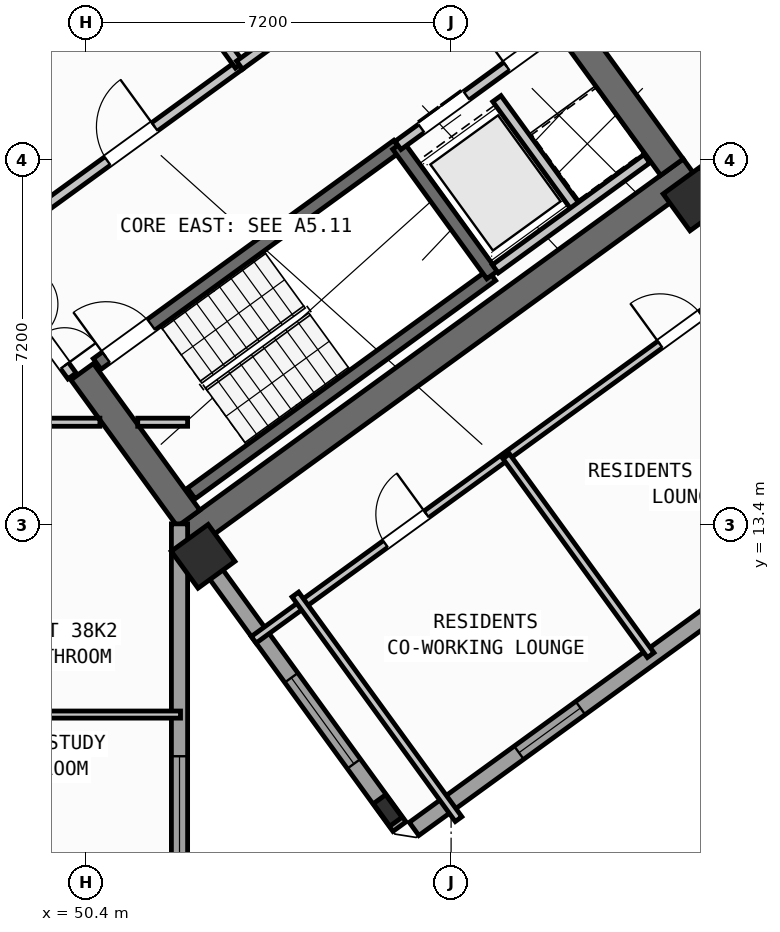
"""IFC4 building model, lengths in metres.
Left out: names, types, materials, properties, quantities, classifications, styles, units other than length and angle.
Written with IfcOpenShell. Run it as: python <this file> out.ifc"""

import sys

from ifc_helpers import new_model, si_unit, direction, frame, frame_2d, origin, origin_2d, place, context, subcontext, project, spatial, rectangle, hollow_rectangle, i_section, extrude, source, transform, mapped, element, fill, save


model = new_model("IFC4")
c1 = context("Model", 3, precision=1e-05, world=origin(), true_north=direction((0.0, 1.0)))
c2 = subcontext(c1, "Body", "Model", "MODEL_VIEW")
j1 = project(units=[si_unit("LENGTHUNIT", "METRE"), si_unit("PLANEANGLEUNIT", "RADIAN")], contexts=[c1])
p1 = place(None, origin())
s1 = spatial("IfcSite", under=j1, at=p1, CompositionType="ELEMENT")
p2 = place(p1, origin())
s2 = spatial("IfcBuilding", under=s1, at=p2, CompositionType="ELEMENT")
p3 = place(p2, frame((0.0, 0.0, 151.5)))
s3 = spatial("IfcBuildingStorey", under=s2, at=p3, CompositionType="ELEMENT", Elevation=151.5)
p4 = place(p3, frame((52.359, 13.14, 0.0), z_axis=(0.0, 0.0, 1.0), x_axis=(0.809014896919, 0.587788139183, 0.0)))
e1 = element("IfcWall", 1, at=p4, inside=s3, PredefinedType="SHEAR", context=c2, shape_type="SweptSolid", body=[
    extrude(rectangle(XDim=12.34, YDim=0.55, at=frame_2d((6.17, 0.0))), origin(), (0.0, 0.0, 1.0), 3.35),
])
for number, where, z_axis, x_axis in (
    (2, (52.42, 13.524, 0.0), (0.0, 0.0, 1.0), (-0.588, 0.809, 0.0)),
    (3, (61.958, 20.454, 0.0), (0.0, 0.0, 1.0), (-0.588, 0.809, 0.0)),
):
    element("IfcWall", number, at=place(p3, frame(where, z_axis=z_axis, x_axis=x_axis)), inside=s3, PredefinedType="SHEAR", context=c2, shape_type="SweptSolid", body=[
        extrude(rectangle(XDim=3.575, YDim=0.55, at=frame_2d((1.788, 0.0))), origin(), (0.0, 0.0, 1.0), 3.35),
    ])
m1 = source(origin(), c2, "Body", "SweptSolid", [
    extrude(i_section(OverallWidth=0.3, OverallDepth=0.55, WebThickness=0.015, FlangeThickness=0.029, at=origin_2d()), origin(), (0.0, 0.0, 1.0), 3.6),
])
p5 = place(p3, frame((56.35, 7.758, 0.0), z_axis=(0.0, 0.0, 1.0), x_axis=(0.809016994375, 0.587785252292, 0.0)))
e4 = element("IfcColumn", 4, at=p5, inside=s3, PredefinedType="COLUMN", context=c2, shape_type="MappedRepresentation", body=[
    mapped(m1, transform((0.0, 0.0, 0.0), scale=1.0)),
])
m2 = source(origin(), c2, "Body", "SweptSolid", [
    extrude(hollow_rectangle(XDim=0.9, YDim=0.9, WallThickness=0.036, at=origin_2d()), origin(), (0.0, 0.0, 1.0), 3.6),
])
for number, where, z_axis, x_axis in (
    (5, (52.705, 12.773, 0.0), (0.0, 0.0, 1.0), (0.809, 0.588, 0.0)),
    (6, (62.414, 19.827, 0.0), (0.0, 0.0, 1.0), (0.809, 0.588, 0.0)),
):
    element("IfcColumn", number, at=place(p3, frame(where, z_axis=z_axis, x_axis=x_axis)), inside=s3, PredefinedType="COLUMN", context=c2, shape_type="MappedRepresentation", body=[
        mapped(m2, transform((0.0, 0.0, 0.0), scale=1.0)),
    ])
p6 = place(p3, frame((58.455, 35.484, 0.0), z_axis=(0.0, 0.0, 1.0), x_axis=(0.587783625747, -0.809018176127, 0.0)))
e7 = element("IfcWall", 7, at=p6, inside=s3, PredefinedType="STANDARD", context=c2, shape_type="SweptSolid", body=[
    extrude(rectangle(XDim=21.587, YDim=0.32, at=frame_2d((10.794, 0.0))), origin(), (0.0, 0.0, 1.0), 2.775),
])
p7 = place(p6, frame((1.504, 0.0, 0.85)))
e8 = element("IfcOpeningElement", 8, at=p7, cuts=e7, PredefinedType="OPENING", context=c2, shape_type="SweptSolid", body=[
    extrude(rectangle(XDim=1.8, YDim=1.5, at=frame_2d((0.9, 0.75))), frame((0.0, 0.17, 0.0), z_axis=(0.0, -1.0, 0.0), x_axis=(1.0, 0.0, 0.0)), (0.0, 0.0, 1.0), 0.34),
])
p8 = place(p6, frame((10.444, 0.0, 0.85)))
e9 = element("IfcOpeningElement", 9, at=p8, cuts=e7, PredefinedType="OPENING", context=c2, shape_type="SweptSolid", body=[
    extrude(rectangle(XDim=1.8, YDim=1.5, at=frame_2d((0.9, 0.75))), frame((0.0, 0.17, 0.0), z_axis=(0.0, -1.0, 0.0), x_axis=(1.0, 0.0, 0.0)), (0.0, 0.0, 1.0), 0.34),
])
p9 = place(p6, frame((17.62, 0.0, 0.85)))
e10 = element("IfcOpeningElement", 10, at=p9, cuts=e7, PredefinedType="OPENING", context=c2, shape_type="SweptSolid", body=[
    extrude(rectangle(XDim=1.5, YDim=1.5, at=frame_2d((0.75, 0.75))), frame((0.0, 0.17, 0.0), z_axis=(0.0, -1.0, 0.0), x_axis=(1.0, 0.0, 0.0)), (0.0, 0.0, 1.0), 0.34),
])
p10 = place(p3, frame((71.098, 17.731, 0.0), z_axis=(0.0, 0.0, 1.0), x_axis=(-0.809021120468, -0.587779573171, 0.0)))
e11 = element("IfcWall", 11, at=p10, inside=s3, PredefinedType="STANDARD", context=c2, shape_type="SweptSolid", body=[
    extrude(rectangle(XDim=17.588, YDim=0.32, at=frame_2d((8.794, 0.0))), origin(), (0.0, 0.0, 1.0), 3.35),
])
p11 = place(p10, frame((1.624, 0.0, 0.0)))
e12 = element("IfcOpeningElement", 12, at=p11, cuts=e11, PredefinedType="OPENING", context=c2, shape_type="SweptSolid", body=[
    extrude(rectangle(XDim=1.05, YDim=2.15, at=frame_2d((0.525, 1.075))), frame((0.0, 0.17, 0.0), z_axis=(0.0, -1.0, 0.0), x_axis=(1.0, 0.0, 0.0)), (0.0, 0.0, 1.0), 0.34),
])
p12 = place(p10, frame((4.104, 0.0, 1.0)))
e13 = element("IfcOpeningElement", 13, at=p12, cuts=e11, PredefinedType="OPENING", context=c2, shape_type="SweptSolid", body=[
    extrude(rectangle(XDim=0.9, YDim=1.25, at=frame_2d((0.45, 0.625))), frame((0.0, 0.17, 0.0), z_axis=(0.0, -1.0, 0.0), x_axis=(1.0, 0.0, 0.0)), (0.0, 0.0, 1.0), 0.34),
])
p13 = place(p10, frame((7.879, 0.0, 0.85)))
e14 = element("IfcOpeningElement", 14, at=p13, cuts=e11, PredefinedType="OPENING", context=c2, shape_type="SweptSolid", body=[
    extrude(rectangle(XDim=1.8, YDim=1.5, at=frame_2d((0.9, 0.75))), frame((0.0, 0.17, 0.0), z_axis=(0.0, -1.0, 0.0), x_axis=(1.0, 0.0, 0.0)), (0.0, 0.0, 1.0), 0.34),
])
p14 = place(p10, frame((13.529, 0.0, 0.85)))
e15 = element("IfcOpeningElement", 15, at=p14, cuts=e11, PredefinedType="OPENING", context=c2, shape_type="SweptSolid", body=[
    extrude(rectangle(XDim=1.5, YDim=1.5, at=frame_2d((0.75, 0.75))), frame((0.0, 0.17, 0.0), z_axis=(0.0, -1.0, 0.0), x_axis=(1.0, 0.0, 0.0)), (0.0, 0.0, 1.0), 0.34),
])
p15 = place(p3, frame((56.581, 7.439, 0.0), z_axis=(0.0, 0.0, 1.0), x_axis=(-0.587771678454, 0.809026856172, 0.0)))
e16 = element("IfcWall", 16, at=p15, inside=s3, PredefinedType="STANDARD", context=c2, shape_type="SweptSolid", body=[
    extrude(rectangle(XDim=6.824, YDim=0.32, at=frame_2d((3.412, 0.0))), origin(), (0.0, 0.0, 1.0), 2.775),
])
p16 = place(p15, frame((1.531, 0.0, 0.8)))
e17 = element("IfcOpeningElement", 17, at=p16, cuts=e16, PredefinedType="OPENING", context=c2, shape_type="SweptSolid", body=[
    extrude(rectangle(XDim=2.1, YDim=1.55, at=frame_2d((1.05, 0.775))), frame((0.0, 0.17, 0.0), z_axis=(0.0, -1.0, 0.0), x_axis=(1.0, 0.0, 0.0)), (0.0, 0.0, 1.0), 0.34),
])
p17 = place(p3, frame((52.24, 13.414, 0.0), z_axis=(0.0, 0.0, 1.0), x_axis=(0.0, -1.0, 0.0)))
e18 = element("IfcWall", 18, at=p17, inside=s3, PredefinedType="STANDARD", context=c2, shape_type="SweptSolid", body=[
    extrude(rectangle(XDim=9.948, YDim=0.32, at=frame_2d((4.974, 0.0))), origin(), (0.0, 0.0, 1.0), 3.35),
])
p18 = place(p17, frame((4.586, 0.0, 0.8)))
e19 = element("IfcOpeningElement", 19, at=p18, cuts=e18, PredefinedType="OPENING", context=c2, shape_type="SweptSolid", body=[
    extrude(rectangle(XDim=2.1, YDim=1.55, at=frame_2d((1.05, 0.775))), frame((0.0, 0.17, 0.0), z_axis=(0.0, -1.0, 0.0), x_axis=(1.0, 0.0, 0.0)), (0.0, 0.0, 1.0), 0.34),
])
p19 = place(p17, frame((8.298, 0.0, 1.0)))
e20 = element("IfcOpeningElement", 20, at=p19, cuts=e18, PredefinedType="OPENING", context=c2, shape_type="SweptSolid", body=[
    extrude(rectangle(XDim=0.9, YDim=1.25, at=frame_2d((0.45, 0.625))), frame((0.0, 0.17, 0.0), z_axis=(0.0, -1.0, 0.0), x_axis=(1.0, 0.0, 0.0)), (0.0, 0.0, 1.0), 0.34),
])
p20 = place(p3, frame((52.472, 14.013, 0.0), z_axis=(0.0, 0.0, 1.0), x_axis=(0.809028366311, 0.587769599847, 0.0)))
e21 = element("IfcWall", 21, at=p20, inside=s3, PredefinedType="SHEAR", context=c2, shape_type="SweptSolid", body=[
    extrude(rectangle(XDim=7.33, YDim=0.26, at=frame_2d((3.665, 0.0))), origin(), (0.0, 0.0, 1.0), 3.35),
])
p21 = place(p3, frame((50.615, 16.57, 0.0), z_axis=(0.0, 0.0, 1.0), x_axis=(0.809028366311, 0.587769599847, 0.0)))
e22 = element("IfcWall", 22, at=p21, inside=s3, PredefinedType="SHEAR", context=c2, shape_type="SweptSolid", body=[
    extrude(rectangle(XDim=7.33, YDim=0.26, at=frame_2d((3.665, 0.0))), origin(), (0.0, 0.0, 1.0), 3.35),
])
p22 = place(p21, frame((0.22, 0.0, 0.0)))
e23 = element("IfcOpeningElement", 23, at=p22, cuts=e22, PredefinedType="OPENING", context=c2, shape_type="SweptSolid", body=[
    extrude(rectangle(XDim=1.1, YDim=2.1, at=frame_2d((0.55, 1.05))), frame((0.0, 0.14, 0.0), z_axis=(0.0, -1.0, 0.0), x_axis=(1.0, 0.0, 0.0)), (0.0, 0.0, 1.0), 0.28),
])
p23 = place(p3, frame((58.41, 18.327, 0.0), z_axis=(0.0, 0.0, 1.0), x_axis=(-0.58776738483, 0.809029975545, 0.0)))
e24 = element("IfcWall", 24, at=p23, inside=s3, PredefinedType="SHEAR", context=c2, shape_type="SweptSolid", body=[
    extrude(rectangle(XDim=3.16, YDim=0.26, at=frame_2d((1.58, 0.0))), origin(), (0.0, 0.0, 1.0), 3.35),
])
p24 = place(p3, frame((47.065, 21.407, 0.0), z_axis=(0.0, 0.0, 1.0), x_axis=(0.809032984992, 0.587763242466, 0.0)))
e25 = element("IfcWall", 25, at=p24, inside=s3, PredefinedType="STANDARD", context=c2, shape_type="SweptSolid", body=[
    extrude(rectangle(XDim=3.448, YDim=0.2, at=frame_2d((1.724, 0.0))), origin(), (0.0, 0.0, 1.0), 3.34),
])
p25 = place(p24, frame((0.458, 0.0, 0.0)))
e26 = element("IfcOpeningElement", 26, at=p25, cuts=e25, PredefinedType="OPENING", context=c2, shape_type="SweptSolid", body=[
    extrude(rectangle(XDim=1.3, YDim=2.2, at=frame_2d((0.65, 1.1))), frame((0.0, 0.11, 0.0), z_axis=(0.0, -1.0, 0.0), x_axis=(1.0, 0.0, 0.0)), (0.0, 0.0, 1.0), 0.22),
])
p26 = place(p3, frame((48.758, 19.077, 0.0), z_axis=(0.0, 0.0, 1.0), x_axis=(0.809005065155, 0.587801671104, 0.0)))
e27 = element("IfcWall", 27, at=p26, inside=s3, PredefinedType="STANDARD", context=c2, shape_type="SweptSolid", body=[
    extrude(rectangle(XDim=5.768, YDim=0.2, at=frame_2d((2.884, 0.0))), origin(), (0.0, 0.0, 1.0), 3.34),
])
p27 = place(p26, frame((2.548, 0.0, 0.0)))
e28 = element("IfcOpeningElement", 28, at=p27, cuts=e27, PredefinedType="OPENING", context=c2, shape_type="SweptSolid", body=[
    extrude(rectangle(XDim=1.15, YDim=2.1, at=frame_2d((0.575, 1.05))), frame((0.0, 0.11, 0.0), z_axis=(0.0, -1.0, 0.0), x_axis=(1.0, 0.0, 0.0)), (0.0, 0.0, 1.0), 0.22),
])
p28 = place(p3, frame((56.553, 20.884, 0.0), z_axis=(0.0, 0.0, 1.0), x_axis=(0.809023564264, 0.58777620951, 0.0)))
e29 = element("IfcWall", 29, at=p28, inside=s3, PredefinedType="STANDARD", context=c2, shape_type="SweptSolid", body=[
    extrude(rectangle(XDim=3.818, YDim=0.2, at=frame_2d((1.909, 0.0))), origin(), (0.0, 0.0, 1.0), 3.34),
])
p29 = place(p28, frame((0.57, 0.0, 0.0)))
e30 = element("IfcOpeningElement", 30, at=p29, cuts=e29, PredefinedType="OPENING", context=c2, shape_type="SweptSolid", body=[
    extrude(rectangle(XDim=1.1, YDim=2.15, at=frame_2d((0.55, 1.075))), frame((0.0, 0.11, 0.0), z_axis=(0.0, -1.0, 0.0), x_axis=(1.0, 0.0, 0.0)), (0.0, 0.0, 1.0), 0.22),
])
p30 = place(p28, frame((2.65, 0.0, 0.0)))
e31 = element("IfcOpeningElement", 31, at=p30, cuts=e29, PredefinedType="OPENING", context=c2, shape_type="SweptSolid", body=[
    extrude(rectangle(XDim=0.86, YDim=2.05, at=frame_2d((0.43, 1.025))), frame((0.0, 0.11, 0.0), z_axis=(0.0, -1.0, 0.0), x_axis=(1.0, 0.0, 0.0)), (0.0, 0.0, 1.0), 0.22),
])
p31 = place(p3, frame((60.067, 19.655, 0.0), z_axis=(0.0, 0.0, 1.0), x_axis=(-0.587800520745, 0.809005900975, 0.0)))
e32 = element("IfcWall", 32, at=p31, inside=s3, PredefinedType="STANDARD", context=c2, shape_type="SweptSolid", body=[
    extrude(rectangle(XDim=2.66, YDim=0.2, at=frame_2d((1.33, 0.0))), origin(), (0.0, 0.0, 1.0), 3.34),
])
p32 = place(p3, frame((58.472, 18.447, 0.0), z_axis=(0.0, 0.0, 1.0), x_axis=(0.809018631237, 0.587782999339, 0.0)))
e33 = element("IfcWall", 33, at=p32, inside=s3, PredefinedType="STANDARD", context=c2, shape_type="SweptSolid", body=[
    extrude(rectangle(XDim=3.698, YDim=0.2, at=frame_2d((1.849, 0.0))), origin(), (0.0, 0.0, 1.0), 3.34),
])
p33 = place(p3, frame((53.425, 22.468, 0.0), z_axis=(0.0, 0.0, 1.0), x_axis=(-0.5877230039, 0.809062216821, 0.0)))
e34 = element("IfcWall", 34, at=p33, inside=s3, PredefinedType="STANDARD", context=c2, shape_type="SweptSolid", body=[
    extrude(rectangle(XDim=2.88, YDim=0.2, at=frame_2d((1.44, 0.0))), origin(), (0.0, 0.0, 1.0), 3.34),
])
p34 = place(p3, frame((53.425, 22.468, 0.0), z_axis=(0.0, 0.0, 1.0), x_axis=(0.809024377198, 0.587775090574, 0.0)))
e35 = element("IfcWall", 35, at=p34, inside=s3, PredefinedType="STANDARD", context=c2, shape_type="SweptSolid", body=[
    extrude(rectangle(XDim=5.418, YDim=0.2, at=frame_2d((2.709, 0.0))), origin(), (0.0, 0.0, 1.0), 3.34),
])
p35 = place(p34, frame((4.28, 0.0, 0.0)))
e36 = element("IfcOpeningElement", 36, at=p35, cuts=e35, PredefinedType="OPENING", context=c2, shape_type="SweptSolid", body=[
    extrude(rectangle(XDim=0.86, YDim=2.05, at=frame_2d((0.43, 1.025))), frame((0.0, 0.11, 0.0), z_axis=(0.0, -1.0, 0.0), x_axis=(1.0, 0.0, 0.0)), (0.0, 0.0, 1.0), 0.22),
])
p36 = place(p34, frame((1.45, 0.0, 0.0)))
e37 = element("IfcOpeningElement", 37, at=p36, cuts=e35, PredefinedType="OPENING", context=c2, shape_type="SweptSolid", body=[
    extrude(rectangle(XDim=0.86, YDim=2.05, at=frame_2d((0.43, 1.025))), frame((0.0, 0.11, 0.0), z_axis=(0.0, -1.0, 0.0), x_axis=(1.0, 0.0, 0.0)), (0.0, 0.0, 1.0), 0.22),
])
p37 = place(p3, frame((35.237, 15.42, 0.0), z_axis=(0.0, 0.0, 1.0), x_axis=(1.0, 0.0, 0.0)))
e38 = element("IfcWall", 38, at=p37, inside=s3, PredefinedType="PARTITIONING", context=c2, shape_type="SweptSolid", body=[
    extrude(rectangle(XDim=15.432, YDim=0.16, at=frame_2d((7.716, 0.0))), origin(), (0.0, 0.0, 1.0), 3.34),
])
p38 = place(p37, frame((0.969, 0.0, 0.0)))
e39 = element("IfcOpeningElement", 39, at=p38, cuts=e38, PredefinedType="OPENING", context=c2, shape_type="SweptSolid", body=[
    extrude(rectangle(XDim=1.0, YDim=2.1, at=frame_2d((0.5, 1.05))), frame((0.0, 0.09, 0.0), z_axis=(0.0, -1.0, 0.0), x_axis=(1.0, 0.0, 0.0)), (0.0, 0.0, 1.0), 0.18),
])
p39 = place(p37, frame((8.799, 0.0, 0.0)))
e40 = element("IfcOpeningElement", 40, at=p39, cuts=e38, PredefinedType="OPENING", context=c2, shape_type="SweptSolid", body=[
    extrude(rectangle(XDim=1.0, YDim=2.1, at=frame_2d((0.5, 1.05))), frame((0.0, 0.09, 0.0), z_axis=(0.0, -1.0, 0.0), x_axis=(1.0, 0.0, 0.0)), (0.0, 0.0, 1.0), 0.18),
])
p40 = place(p3, frame((51.416, 15.42, 0.0), z_axis=(0.0, 0.0, 1.0), x_axis=(1.0, 0.0, 0.0)))
e41 = element("IfcWall", 41, at=p40, inside=s3, PredefinedType="PARTITIONING", context=c2, shape_type="SweptSolid", body=[
    extrude(rectangle(XDim=0.984, YDim=0.16, at=frame_2d((0.492, 0.0))), origin(), (0.0, 0.0, 1.0), 3.34),
])
p41 = place(p3, frame((50.119, 16.333, 0.0), z_axis=(0.0, 0.0, 1.0), x_axis=(-0.587749856981, 0.809042709391, 0.0)))
e42 = element("IfcWall", 42, at=p41, inside=s3, PredefinedType="STANDARD", context=c2, shape_type="SweptSolid", body=[
    extrude(rectangle(XDim=2.96, YDim=0.2, at=frame_2d((1.48, 0.0))), origin(), (0.0, 0.0, 1.0), 3.34),
])
p42 = place(p41, frame((0.25, 0.0, 0.0)))
e43 = element("IfcOpeningElement", 43, at=p42, cuts=e42, PredefinedType="OPENING", context=c2, shape_type="SweptSolid", body=[
    extrude(rectangle(XDim=1.5, YDim=2.15, at=frame_2d((0.75, 1.075))), frame((0.0, 0.11, 0.0), z_axis=(0.0, -1.0, 0.0), x_axis=(1.0, 0.0, 0.0)), (0.0, 0.0, 1.0), 0.22),
])
p43 = place(p3, frame((47.072, 9.65, 0.0), z_axis=(0.0, 0.0, 1.0), x_axis=(1.0, 0.0, 0.0)))
e44 = element("IfcWall", 44, at=p43, inside=s3, PredefinedType="PLUMBINGWALL", context=c2, shape_type="SweptSolid", body=[
    extrude(rectangle(XDim=5.188, YDim=0.14, at=frame_2d((2.594, 0.0))), origin(), (0.0, 0.0, 1.0), 3.34),
])
p44 = place(p3, frame((68.353, 15.922, 0.0), z_axis=(0.0, 0.0, 1.0), x_axis=(-0.587782002009, 0.809019355834, 0.0)))
e45 = element("IfcWall", 45, at=p44, inside=s3, PredefinedType="PARTITIONING", context=c2, shape_type="SweptSolid", body=[
    extrude(rectangle(XDim=15.35, YDim=0.16, at=frame_2d((7.675, 0.0))), origin(), (0.0, 0.0, 1.0), 3.34),
])
p45 = place(p3, frame((53.705, 11.126, 0.0), z_axis=(0.0, 0.0, 1.0), x_axis=(0.809014504436, 0.587788679384, 0.0)))
e46 = element("IfcWall", 46, at=p45, inside=s3, PredefinedType="PARTITIONING", context=c2, shape_type="SweptSolid", body=[
    extrude(rectangle(XDim=14.67, YDim=0.16, at=frame_2d((7.335, 0.0))), origin(), (0.0, 0.0, 1.0), 3.34),
])
p46 = place(p45, frame((3.215, 0.0, 0.0)))
e47 = element("IfcOpeningElement", 47, at=p46, cuts=e46, PredefinedType="OPENING", context=c2, shape_type="SweptSolid", body=[
    extrude(rectangle(XDim=1.0, YDim=2.1, at=frame_2d((0.5, 1.05))), frame((0.0, 0.09, 0.0), z_axis=(0.0, -1.0, 0.0), x_axis=(1.0, 0.0, 0.0)), (0.0, 0.0, 1.0), 0.18),
])
p47 = place(p45, frame((9.915, 0.0, 0.0)))
e48 = element("IfcOpeningElement", 48, at=p47, cuts=e46, PredefinedType="OPENING", context=c2, shape_type="SweptSolid", body=[
    extrude(rectangle(XDim=1.0, YDim=2.1, at=frame_2d((0.5, 1.05))), frame((0.0, 0.09, 0.0), z_axis=(0.0, -1.0, 0.0), x_axis=(1.0, 0.0, 0.0)), (0.0, 0.0, 1.0), 0.18),
])
p48 = place(p3, frame((57.747, 7.586, 0.0), z_axis=(0.0, 0.0, 1.0), x_axis=(-0.587784893399, 0.809017255126, 0.0)))
e49 = element("IfcWall", 49, at=p48, inside=s3, PredefinedType="PARTITIONING", context=c2, shape_type="SweptSolid", body=[
    extrude(rectangle(XDim=5.48, YDim=0.16, at=frame_2d((2.74, 0.0))), origin(), (0.0, 0.0, 1.0), 3.34),
])
p49 = place(p3, frame((61.539, 10.823, 0.0), z_axis=(0.0, 0.0, 1.0), x_axis=(-0.587785532001, 0.809016791155, 0.0)))
e50 = element("IfcWall", 50, at=p49, inside=s3, PredefinedType="PARTITIONING", context=c2, shape_type="SweptSolid", body=[
    extrude(rectangle(XDim=4.85, YDim=0.16, at=frame_2d((2.425, 0.0))), origin(), (0.0, 0.0, 1.0), 3.34),
])
m3 = source(origin(), c2, "Body", "SweptSolid", [
    extrude(rectangle(XDim=1.5, YDim=1.5, at=frame_2d((0.75, 0.75))), frame((0.0, 0.03, 0.0), z_axis=(0.0, -1.0, 0.0), x_axis=(1.0, 0.0, 0.0)), (0.0, 0.0, 1.0), 0.06),
])
p50 = place(p14, origin())
e51 = element("IfcWindow", 51, at=p50, inside=s3, PartitioningType="SINGLE_PANEL", PredefinedType="WINDOW", context=c2, shape_type="MappedRepresentation", body=[
    mapped(m3, transform((0.0, 0.0, 0.0), scale=1.0)),
])
fill(e15, e51)
m4 = source(origin(), c2, "Body", "SweptSolid", [
    extrude(rectangle(XDim=2.1, YDim=1.55, at=frame_2d((1.05, 0.775))), frame((0.0, 0.03, 0.0), z_axis=(0.0, -1.0, 0.0), x_axis=(1.0, 0.0, 0.0)), (0.0, 0.0, 1.0), 0.06),
])
p51 = place(p16, origin())
e52 = element("IfcWindow", 52, at=p51, inside=s3, PartitioningType="SINGLE_PANEL", PredefinedType="WINDOW", context=c2, shape_type="MappedRepresentation", body=[
    mapped(m4, transform((0.0, 0.0, 0.0), scale=1.0)),
])
fill(e17, e52)
p52 = place(p18, origin())
e53 = element("IfcWindow", 53, at=p52, inside=s3, PartitioningType="SINGLE_PANEL", PredefinedType="WINDOW", context=c2, shape_type="MappedRepresentation", body=[
    mapped(m4, transform((0.0, 0.0, 0.0), scale=1.0)),
])
fill(e19, e53)
m5 = source(origin(), c2, "Body", "SweptSolid", [
    extrude(rectangle(XDim=1.1, YDim=2.1, at=frame_2d((0.55, 1.05))), frame((0.0, 0.025, 0.0), z_axis=(0.0, -1.0, 0.0), x_axis=(1.0, 0.0, 0.0)), (0.0, 0.0, 1.0), 0.05),
])
p53 = place(p22, origin())
e54 = element("IfcDoor", 54, at=p53, inside=s3, OperationType="SINGLE_SWING_LEFT", PredefinedType="DOOR", context=c2, shape_type="MappedRepresentation", body=[
    mapped(m5, transform((0.0, 0.0, 0.0), scale=1.0)),
])
fill(e23, e54)
m6 = source(origin(), c2, "Body", "SweptSolid", [
    extrude(rectangle(XDim=1.15, YDim=2.1, at=frame_2d((0.575, 1.05))), frame((0.0, 0.025, 0.0), z_axis=(0.0, -1.0, 0.0), x_axis=(1.0, 0.0, 0.0)), (0.0, 0.0, 1.0), 0.05),
])
p54 = place(p27, origin())
e55 = element("IfcDoor", 55, at=p54, inside=s3, OperationType="SINGLE_SWING_RIGHT", PredefinedType="DOOR", context=c2, shape_type="MappedRepresentation", body=[
    mapped(m6, transform((0.0, 0.0, 0.0), scale=1.0)),
])
fill(e28, e55)
m7 = source(origin(), c2, "Body", "SweptSolid", [
    extrude(rectangle(XDim=1.1, YDim=2.15, at=frame_2d((0.55, 1.075))), frame((0.0, 0.025, 0.0), z_axis=(0.0, -1.0, 0.0), x_axis=(1.0, 0.0, 0.0)), (0.0, 0.0, 1.0), 0.05),
])
p55 = place(p29, origin())
e56 = element("IfcDoor", 56, at=p55, inside=s3, OperationType="DOUBLE_DOOR_SLIDING", PredefinedType="DOOR", context=c2, shape_type="MappedRepresentation", body=[
    mapped(m7, transform((0.0, 0.0, 0.0), scale=1.0)),
])
fill(e30, e56)
m8 = source(origin(), c2, "Body", "SweptSolid", [
    extrude(rectangle(XDim=0.86, YDim=2.05, at=frame_2d((0.43, 1.025))), frame((0.0, 0.025, 0.0), z_axis=(0.0, -1.0, 0.0), x_axis=(1.0, 0.0, 0.0)), (0.0, 0.0, 1.0), 0.05),
])
p56 = place(p30, origin())
e57 = element("IfcDoor", 57, at=p56, inside=s3, OperationType="SINGLE_SWING_LEFT", PredefinedType="DOOR", context=c2, shape_type="MappedRepresentation", body=[
    mapped(m8, transform((0.0, 0.0, 0.0), scale=1.0)),
])
fill(e31, e57)
m9 = source(origin(), c2, "Body", "SweptSolid", [
    extrude(rectangle(XDim=1.5, YDim=2.15, at=frame_2d((0.75, 1.075))), frame((0.0, 0.025, 0.0), z_axis=(0.0, -1.0, 0.0), x_axis=(1.0, 0.0, 0.0)), (0.0, 0.0, 1.0), 0.05),
])
p57 = place(p42, frame((1.5, 0.0, 0.0), z_axis=(0.0, 0.0, 1.0), x_axis=(-1.0, 0.0, 0.0)))
e58 = element("IfcDoor", 58, at=p57, inside=s3, OperationType="DOUBLE_DOOR_SINGLE_SWING", PredefinedType="DOOR", context=c2, shape_type="MappedRepresentation", body=[
    mapped(m9, transform((0.0, 0.0, 0.0), scale=1.0)),
])
fill(e43, e58)
m10 = source(origin(), c2, "Body", "SweptSolid", [
    extrude(rectangle(XDim=1.0, YDim=2.1, at=frame_2d((0.5, 1.05))), frame((0.0, 0.025, 0.0), z_axis=(0.0, -1.0, 0.0), x_axis=(1.0, 0.0, 0.0)), (0.0, 0.0, 1.0), 0.05),
])
p58 = place(p46, origin())
e59 = element("IfcDoor", 59, at=p58, inside=s3, OperationType="SINGLE_SWING_RIGHT", PredefinedType="DOOR", context=c2, shape_type="MappedRepresentation", body=[
    mapped(m10, transform((0.0, 0.0, 0.0), scale=1.0)),
])
fill(e47, e59)
p59 = place(p47, origin())
e60 = element("IfcDoor", 60, at=p59, inside=s3, OperationType="SINGLE_SWING_LEFT", PredefinedType="DOOR", context=c2, shape_type="MappedRepresentation", body=[
    mapped(m10, transform((0.0, 0.0, 0.0), scale=1.0)),
])
fill(e48, e60)
save(model, sys.argv[1])
